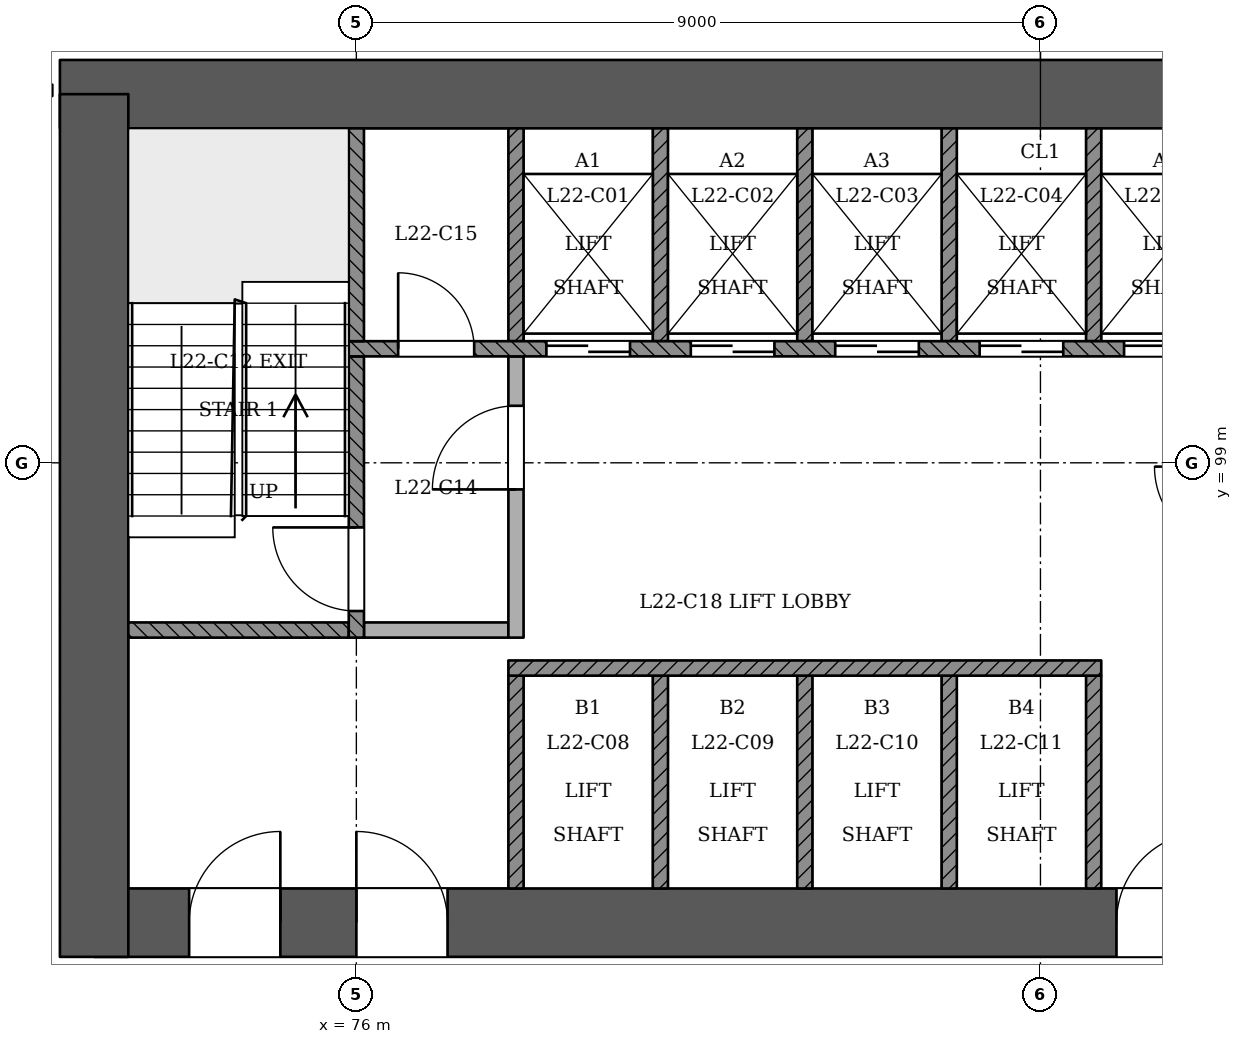
"""IFC4 building model, lengths in metres.
Left out: names, types, materials, properties, quantities, classifications, styles, units other than length and angle.
Written with IfcOpenShell. Run it as: python <this file> out.ifc"""

import sys

from ifc_helpers import new_model, si_unit, direction, frame, frame_2d, origin, place, context, subcontext, project, spatial, rectangle, extrude, element, fill, save


model = new_model("IFC4")
c1 = context("Model", 3, precision=1e-05, world=origin(), true_north=direction((0.0, 1.0)))
c2 = subcontext(c1, "Body", "Model", "MODEL_VIEW")
j1 = project(units=[si_unit("LENGTHUNIT", "METRE"), si_unit("PLANEANGLEUNIT", "RADIAN")], contexts=[c1])
p1 = place(None, origin())
s1 = spatial("IfcSite", under=j1, at=p1, CompositionType="ELEMENT")
p2 = place(p1, origin())
s2 = spatial("IfcBuilding", under=s1, at=p2, CompositionType="ELEMENT")
p3 = place(p2, frame((0.0, 0.0, 88.2)))
s3 = spatial("IfcBuildingStorey", under=s2, at=p3, CompositionType="ELEMENT", Elevation=88.2)
p4 = place(p3, frame((72.55, 92.95, 0.0), z_axis=(0.0, 0.0, 1.0), x_axis=(1.0, 0.0, 0.0)))
e1 = element("IfcWall", 1, at=p4, inside=s3, PredefinedType="SHEAR", context=c2, shape_type="SweptSolid", body=[
    extrude(rectangle(XDim=25.35, YDim=0.9, at=frame_2d((12.675, 0.0))), origin(), (0.0, 0.0, 1.0), 3.6),
])
p5 = place(p4, frame((1.25, 0.0, 0.0)))
e2 = element("IfcOpeningElement", 2, at=p5, cuts=e1, PredefinedType="OPENING", context=c2, shape_type="SweptSolid", body=[
    extrude(rectangle(XDim=1.2, YDim=2.1, at=frame_2d((0.6, 1.05))), frame((0.0, 0.46, 0.0), z_axis=(0.0, -1.0, 0.0), x_axis=(1.0, 0.0, 0.0)), (0.0, 0.0, 1.0), 0.921),
])
p6 = place(p4, frame((3.45, 0.0, 0.0)))
e3 = element("IfcOpeningElement", 3, at=p6, cuts=e1, PredefinedType="OPENING", context=c2, shape_type="SweptSolid", body=[
    extrude(rectangle(XDim=1.2, YDim=2.1, at=frame_2d((0.6, 1.05))), frame((0.0, 0.46, 0.0), z_axis=(0.0, -1.0, 0.0), x_axis=(1.0, 0.0, 0.0)), (0.0, 0.0, 1.0), 0.921),
])
p7 = place(p4, frame((13.45, 0.0, 0.0)))
e4 = element("IfcOpeningElement", 4, at=p7, cuts=e1, PredefinedType="OPENING", context=c2, shape_type="SweptSolid", body=[
    extrude(rectangle(XDim=1.2, YDim=2.1, at=frame_2d((0.6, 1.05))), frame((0.0, 0.46, 0.0), z_axis=(0.0, -1.0, 0.0), x_axis=(1.0, 0.0, 0.0)), (0.0, 0.0, 1.0), 0.921),
])
p8 = place(p4, frame((15.712, 0.0, 0.0)))
e5 = element("IfcOpeningElement", 5, at=p8, cuts=e1, PredefinedType="OPENING", context=c2, shape_type="SweptSolid", body=[
    extrude(rectangle(XDim=1.0, YDim=2.1, at=frame_2d((0.5, 1.05))), frame((0.0, 0.46, 0.0), z_axis=(0.0, -1.0, 0.0), x_axis=(1.0, 0.0, 0.0)), (0.0, 0.0, 1.0), 0.921),
])
p9 = place(p4, frame((18.35, 0.0, 0.0)))
e6 = element("IfcOpeningElement", 6, at=p9, cuts=e1, PredefinedType="OPENING", context=c2, shape_type="SweptSolid", body=[
    extrude(rectangle(XDim=1.0, YDim=2.1, at=frame_2d((0.5, 1.05))), frame((0.0, 0.46, 0.0), z_axis=(0.0, -1.0, 0.0), x_axis=(1.0, 0.0, 0.0)), (0.0, 0.0, 1.0), 0.921),
])
p10 = place(p4, frame((21.938, 0.0, 0.0)))
e7 = element("IfcOpeningElement", 7, at=p10, cuts=e1, PredefinedType="OPENING", context=c2, shape_type="SweptSolid", body=[
    extrude(rectangle(XDim=1.0, YDim=2.1, at=frame_2d((0.5, 1.05))), frame((0.0, 0.46, 0.0), z_axis=(0.0, -1.0, 0.0), x_axis=(1.0, 0.0, 0.0)), (0.0, 0.0, 1.0), 0.921),
])
p11 = place(p3, frame((97.45, 103.85, 0.0), z_axis=(0.0, 0.0, 1.0), x_axis=(-1.0, 0.0, 0.0)))
e8 = element("IfcWall", 8, at=p11, inside=s3, PredefinedType="SHEAR", context=c2, shape_type="SweptSolid", body=[
    extrude(rectangle(XDim=25.35, YDim=0.9, at=frame_2d((12.675, 0.0))), origin(), (0.0, 0.0, 1.0), 3.6),
])
p12 = place(p3, frame((72.55, 103.85, 0.0), z_axis=(0.0, 0.0, 1.0), x_axis=(0.0, -1.0, 0.0)))
e9 = element("IfcWall", 9, at=p12, inside=s3, PredefinedType="SHEAR", context=c2, shape_type="SweptSolid", body=[
    extrude(rectangle(XDim=11.35, YDim=0.9, at=frame_2d((5.675, 0.0))), origin(), (0.0, 0.0, 1.0), 3.6),
])
p13 = place(p3, frame((63.198, 97.473, 0.0), z_axis=(0.0, 0.0, 1.0), x_axis=(0.499996804348, -0.866027248787, 0.0)))
e10 = element("IfcWall", 10, at=p13, inside=s3, PredefinedType="PARTITIONING", context=c2, shape_type="SweptSolid", body=[
    extrude(rectangle(XDim=42.418, YDim=0.15, at=frame_2d((21.209, 0.0))), origin(), (0.0, 0.0, 1.0), 2.7),
])
p14 = place(p13, frame((3.123, 0.0, 0.0)))
e11 = element("IfcOpeningElement", 11, at=p14, cuts=e10, PredefinedType="OPENING", context=c2, shape_type="SweptSolid", body=[
    extrude(rectangle(XDim=1.2, YDim=2.1, at=frame_2d((0.6, 1.05))), frame((0.0, 0.085, 0.0), z_axis=(0.0, -1.0, 0.0), x_axis=(1.0, 0.0, 0.0)), (0.0, 0.0, 1.0), 0.171),
])
p15 = place(p13, frame((10.538, 0.0, 0.0)))
e12 = element("IfcOpeningElement", 12, at=p15, cuts=e10, PredefinedType="OPENING", context=c2, shape_type="SweptSolid", body=[
    extrude(rectangle(XDim=1.1, YDim=2.1, at=frame_2d((0.55, 1.05))), frame((0.0, 0.085, 0.0), z_axis=(0.0, -1.0, 0.0), x_axis=(1.0, 0.0, 0.0)), (0.0, 0.0, 1.0), 0.171),
])
p16 = place(p13, frame((12.814, 0.0, 0.0)))
e13 = element("IfcOpeningElement", 13, at=p16, cuts=e10, PredefinedType="OPENING", context=c2, shape_type="SweptSolid", body=[
    extrude(rectangle(XDim=1.0, YDim=2.1, at=frame_2d((0.5, 1.05))), frame((0.0, 0.085, 0.0), z_axis=(0.0, -1.0, 0.0), x_axis=(1.0, 0.0, 0.0)), (0.0, 0.0, 1.0), 0.171),
])
p17 = place(p13, frame((20.609, 0.0, 0.0)))
e14 = element("IfcOpeningElement", 14, at=p17, cuts=e10, PredefinedType="OPENING", context=c2, shape_type="SweptSolid", body=[
    extrude(rectangle(XDim=1.2, YDim=2.1, at=frame_2d((0.6, 1.05))), frame((0.0, 0.085, 0.0), z_axis=(0.0, -1.0, 0.0), x_axis=(1.0, 0.0, 0.0)), (0.0, 0.0, 1.0), 0.171),
])
p18 = place(p13, frame((27.459, 0.0, 0.0)))
e15 = element("IfcOpeningElement", 15, at=p18, cuts=e10, PredefinedType="OPENING", context=c2, shape_type="SweptSolid", body=[
    extrude(rectangle(XDim=1.0, YDim=2.1, at=frame_2d((0.5, 1.05))), frame((0.0, 0.085, 0.0), z_axis=(0.0, -1.0, 0.0), x_axis=(1.0, 0.0, 0.0)), (0.0, 0.0, 1.0), 0.171),
])
p19 = place(p13, frame((31.959, 0.0, 0.0)))
e16 = element("IfcOpeningElement", 16, at=p19, cuts=e10, PredefinedType="OPENING", context=c2, shape_type="SweptSolid", body=[
    extrude(rectangle(XDim=1.0, YDim=2.1, at=frame_2d((0.5, 1.05))), frame((0.0, 0.085, 0.0), z_axis=(0.0, -1.0, 0.0), x_axis=(1.0, 0.0, 0.0)), (0.0, 0.0, 1.0), 0.171),
])
p20 = place(p13, frame((40.905, 0.0, 0.0)))
e17 = element("IfcOpeningElement", 17, at=p20, cuts=e10, PredefinedType="OPENING", context=c2, shape_type="SweptSolid", body=[
    extrude(rectangle(XDim=1.2, YDim=2.1, at=frame_2d((0.6, 1.05))), frame((0.0, 0.085, 0.0), z_axis=(0.0, -1.0, 0.0), x_axis=(1.0, 0.0, 0.0)), (0.0, 0.0, 1.0), 0.171),
])
for number, where, z_axis, x_axis in (
    (18, (78.1, 93.4, 0.0), (0.0, 0.0, 1.0), (0.0, 1.0, 0.0)),
    (19, (80.0, 93.4, 0.0), (0.0, 0.0, 1.0), (0.0, 1.0, 0.0)),
    (20, (81.9, 93.4, 0.0), (0.0, 0.0, 1.0), (0.0, 1.0, 0.0)),
    (21, (83.8, 93.4, 0.0), (0.0, 0.0, 1.0), (0.0, 1.0, 0.0)),
    (22, (85.7, 93.4, 0.0), (0.0, 0.0, 1.0), (0.0, 1.0, 0.0)),
):
    element("IfcWall", number, at=place(p3, frame(where, z_axis=z_axis, x_axis=x_axis)), inside=s3, PredefinedType="SOLIDWALL", context=c2, shape_type="SweptSolid", body=[
        extrude(rectangle(XDim=2.8, YDim=0.2, at=frame_2d((1.4, 0.0))), origin(), (0.0, 0.0, 1.0), 3.1),
    ])
p21 = place(p3, frame((78.0, 96.3, 0.0), z_axis=(0.0, 0.0, 1.0), x_axis=(1.0, 0.0, 0.0)))
e23 = element("IfcWall", 23, at=p21, inside=s3, PredefinedType="SOLIDWALL", context=c2, shape_type="SweptSolid", body=[
    extrude(rectangle(XDim=7.8, YDim=0.2, at=frame_2d((3.9, 0.0))), origin(), (0.0, 0.0, 1.0), 3.1),
])
p22 = place(p3, frame((73.0, 96.8, 0.0), z_axis=(0.0, 0.0, 1.0), x_axis=(1.0, 0.0, 0.0)))
e24 = element("IfcWall", 24, at=p22, inside=s3, PredefinedType="SOLIDWALL", context=c2, shape_type="SweptSolid", body=[
    extrude(rectangle(XDim=2.9, YDim=0.2, at=frame_2d((1.45, 0.0))), origin(), (0.0, 0.0, 1.0), 3.1),
])
p23 = place(p3, frame((76.0, 96.7, 0.0), z_axis=(0.0, 0.0, 1.0), x_axis=(0.0, 1.0, 0.0)))
e25 = element("IfcWall", 25, at=p23, inside=s3, PredefinedType="SOLIDWALL", context=c2, shape_type="SweptSolid", body=[
    extrude(rectangle(XDim=3.7, YDim=0.2, at=frame_2d((1.85, 0.0))), origin(), (0.0, 0.0, 1.0), 3.1),
])
p24 = place(p23, frame((0.35, 0.0, 0.0)))
e26 = element("IfcOpeningElement", 26, at=p24, cuts=e25, PredefinedType="OPENING", context=c2, shape_type="SweptSolid", body=[
    extrude(rectangle(XDim=1.1, YDim=2.1, at=frame_2d((0.55, 1.05))), frame((0.0, 0.11, 0.0), z_axis=(0.0, -1.0, 0.0), x_axis=(1.0, 0.0, 0.0)), (0.0, 0.0, 1.0), 0.221),
])
p25 = place(p3, frame((76.1, 96.8, 0.0), z_axis=(0.0, 0.0, 1.0), x_axis=(1.0, 0.0, 0.0)))
e27 = element("IfcWall", 27, at=p25, inside=s3, PredefinedType="PARTITIONING", context=c2, shape_type="SweptSolid", body=[
    extrude(rectangle(XDim=1.9, YDim=0.2, at=frame_2d((0.95, 0.0))), origin(), (0.0, 0.0, 1.0), 3.1),
])
p26 = place(p3, frame((78.1, 96.7, 0.0), z_axis=(0.0, 0.0, 1.0), x_axis=(0.0, 1.0, 0.0)))
e28 = element("IfcWall", 28, at=p26, inside=s3, PredefinedType="PARTITIONING", context=c2, shape_type="SweptSolid", body=[
    extrude(rectangle(XDim=3.7, YDim=0.2, at=frame_2d((1.85, 0.0))), origin(), (0.0, 0.0, 1.0), 3.1),
])
p27 = place(p26, frame((1.95, 0.0, 0.0)))
e29 = element("IfcOpeningElement", 29, at=p27, cuts=e28, PredefinedType="OPENING", context=c2, shape_type="SweptSolid", body=[
    extrude(rectangle(XDim=1.1, YDim=2.1, at=frame_2d((0.55, 1.05))), frame((0.0, 0.11, 0.0), z_axis=(0.0, -1.0, 0.0), x_axis=(1.0, 0.0, 0.0)), (0.0, 0.0, 1.0), 0.221),
])
p28 = place(p3, frame((75.9, 100.5, 0.0), z_axis=(0.0, 0.0, 1.0), x_axis=(1.0, 0.0, 0.0)))
e30 = element("IfcWall", 30, at=p28, inside=s3, PredefinedType="SOLIDWALL", context=c2, shape_type="SweptSolid", body=[
    extrude(rectangle(XDim=18.2, YDim=0.2, at=frame_2d((9.1, 0.0))), origin(), (0.0, 0.0, 1.0), 3.1),
])
p29 = place(p28, frame((2.6, 0.0, 0.0)))
e31 = element("IfcOpeningElement", 31, at=p29, cuts=e30, PredefinedType="OPENING", context=c2, shape_type="SweptSolid", body=[
    extrude(rectangle(XDim=1.1, YDim=2.1, at=frame_2d((0.55, 1.05))), frame((0.0, 0.11, 0.0), z_axis=(0.0, -1.0, 0.0), x_axis=(1.0, 0.0, 0.0)), (0.0, 0.0, 1.0), 0.221),
])
p30 = place(p28, frame((4.5, 0.0, 0.0)))
e32 = element("IfcOpeningElement", 32, at=p30, cuts=e30, PredefinedType="OPENING", context=c2, shape_type="SweptSolid", body=[
    extrude(rectangle(XDim=1.1, YDim=2.1, at=frame_2d((0.55, 1.05))), frame((0.0, 0.11, 0.0), z_axis=(0.0, -1.0, 0.0), x_axis=(1.0, 0.0, 0.0)), (0.0, 0.0, 1.0), 0.221),
])
p31 = place(p28, frame((6.4, 0.0, 0.0)))
e33 = element("IfcOpeningElement", 33, at=p31, cuts=e30, PredefinedType="OPENING", context=c2, shape_type="SweptSolid", body=[
    extrude(rectangle(XDim=1.1, YDim=2.1, at=frame_2d((0.55, 1.05))), frame((0.0, 0.11, 0.0), z_axis=(0.0, -1.0, 0.0), x_axis=(1.0, 0.0, 0.0)), (0.0, 0.0, 1.0), 0.221),
])
p32 = place(p28, frame((8.3, 0.0, 0.0)))
e34 = element("IfcOpeningElement", 34, at=p32, cuts=e30, PredefinedType="OPENING", context=c2, shape_type="SweptSolid", body=[
    extrude(rectangle(XDim=1.1, YDim=2.1, at=frame_2d((0.55, 1.05))), frame((0.0, 0.11, 0.0), z_axis=(0.0, -1.0, 0.0), x_axis=(1.0, 0.0, 0.0)), (0.0, 0.0, 1.0), 0.221),
])
p33 = place(p28, frame((10.2, 0.0, 0.0)))
e35 = element("IfcOpeningElement", 35, at=p33, cuts=e30, PredefinedType="OPENING", context=c2, shape_type="SweptSolid", body=[
    extrude(rectangle(XDim=1.1, YDim=2.1, at=frame_2d((0.55, 1.05))), frame((0.0, 0.11, 0.0), z_axis=(0.0, -1.0, 0.0), x_axis=(1.0, 0.0, 0.0)), (0.0, 0.0, 1.0), 0.221),
])
p34 = place(p28, frame((12.1, 0.0, 0.0)))
e36 = element("IfcOpeningElement", 36, at=p34, cuts=e30, PredefinedType="OPENING", context=c2, shape_type="SweptSolid", body=[
    extrude(rectangle(XDim=1.1, YDim=2.1, at=frame_2d((0.55, 1.05))), frame((0.0, 0.11, 0.0), z_axis=(0.0, -1.0, 0.0), x_axis=(1.0, 0.0, 0.0)), (0.0, 0.0, 1.0), 0.221),
])
p35 = place(p28, frame((14.0, 0.0, 0.0)))
e37 = element("IfcOpeningElement", 37, at=p35, cuts=e30, PredefinedType="OPENING", context=c2, shape_type="SweptSolid", body=[
    extrude(rectangle(XDim=1.1, YDim=2.1, at=frame_2d((0.55, 1.05))), frame((0.0, 0.11, 0.0), z_axis=(0.0, -1.0, 0.0), x_axis=(1.0, 0.0, 0.0)), (0.0, 0.0, 1.0), 0.221),
])
p36 = place(p28, frame((0.65, 0.0, 0.0)))
e38 = element("IfcOpeningElement", 38, at=p36, cuts=e30, PredefinedType="OPENING", context=c2, shape_type="SweptSolid", body=[
    extrude(rectangle(XDim=1.0, YDim=2.1, at=frame_2d((0.5, 1.05))), frame((0.0, 0.11, 0.0), z_axis=(0.0, -1.0, 0.0), x_axis=(1.0, 0.0, 0.0)), (0.0, 0.0, 1.0), 0.221),
])
p37 = place(p28, frame((16.3, 0.0, 0.0)))
e39 = element("IfcOpeningElement", 39, at=p37, cuts=e30, PredefinedType="OPENING", context=c2, shape_type="SweptSolid", body=[
    extrude(rectangle(XDim=1.0, YDim=2.1, at=frame_2d((0.5, 1.05))), frame((0.0, 0.11, 0.0), z_axis=(0.0, -1.0, 0.0), x_axis=(1.0, 0.0, 0.0)), (0.0, 0.0, 1.0), 0.221),
])
for number, where, z_axis, x_axis in (
    (40, (76.0, 100.6, 0.0), (0.0, 0.0, 1.0), (0.0, 1.0, 0.0)),
    (41, (78.1, 100.6, 0.0), (0.0, 0.0, 1.0), (0.0, 1.0, 0.0)),
    (42, (80.0, 100.6, 0.0), (0.0, 0.0, 1.0), (0.0, 1.0, 0.0)),
    (43, (81.9, 100.6, 0.0), (0.0, 0.0, 1.0), (0.0, 1.0, 0.0)),
    (44, (83.8, 100.6, 0.0), (0.0, 0.0, 1.0), (0.0, 1.0, 0.0)),
    (45, (85.7, 100.6, 0.0), (0.0, 0.0, 1.0), (0.0, 1.0, 0.0)),
):
    element("IfcWall", number, at=place(p3, frame(where, z_axis=z_axis, x_axis=x_axis)), inside=s3, PredefinedType="SOLIDWALL", context=c2, shape_type="SweptSolid", body=[
        extrude(rectangle(XDim=2.8, YDim=0.2, at=frame_2d((1.4, 0.0))), origin(), (0.0, 0.0, 1.0), 3.1),
    ])
p38 = place(p29, origin())
e46 = element("IfcDoor", 46, at=p38, inside=s3, OperationType="SLIDING_TO_RIGHT", PredefinedType="NOTDEFINED", context=c2, shape_type="SweptSolid", body=[
    extrude(rectangle(XDim=1.1, YDim=2.1, at=frame_2d((0.55, 1.05))), frame((0.0, 0.025, 0.0), z_axis=(0.0, -1.0, 0.0), x_axis=(1.0, 0.0, 0.0)), (0.0, 0.0, 1.0), 0.05),
])
fill(e31, e46)
p39 = place(p30, origin())
e47 = element("IfcDoor", 47, at=p39, inside=s3, OperationType="SLIDING_TO_LEFT", PredefinedType="NOTDEFINED", context=c2, shape_type="SweptSolid", body=[
    extrude(rectangle(XDim=1.1, YDim=2.1, at=frame_2d((0.55, 1.05))), frame((0.0, 0.025, 0.0), z_axis=(0.0, -1.0, 0.0), x_axis=(1.0, 0.0, 0.0)), (0.0, 0.0, 1.0), 0.05),
])
fill(e32, e47)
p40 = place(p31, origin())
e48 = element("IfcDoor", 48, at=p40, inside=s3, OperationType="SLIDING_TO_RIGHT", PredefinedType="NOTDEFINED", context=c2, shape_type="SweptSolid", body=[
    extrude(rectangle(XDim=1.1, YDim=2.1, at=frame_2d((0.55, 1.05))), frame((0.0, 0.025, 0.0), z_axis=(0.0, -1.0, 0.0), x_axis=(1.0, 0.0, 0.0)), (0.0, 0.0, 1.0), 0.05),
])
fill(e33, e48)
p41 = place(p32, origin())
e49 = element("IfcDoor", 49, at=p41, inside=s3, OperationType="SLIDING_TO_LEFT", PredefinedType="NOTDEFINED", context=c2, shape_type="SweptSolid", body=[
    extrude(rectangle(XDim=1.1, YDim=2.1, at=frame_2d((0.55, 1.05))), frame((0.0, 0.025, 0.0), z_axis=(0.0, -1.0, 0.0), x_axis=(1.0, 0.0, 0.0)), (0.0, 0.0, 1.0), 0.05),
])
fill(e34, e49)
p42 = place(p33, origin())
e50 = element("IfcDoor", 50, at=p42, inside=s3, OperationType="SLIDING_TO_RIGHT", PredefinedType="NOTDEFINED", context=c2, shape_type="SweptSolid", body=[
    extrude(rectangle(XDim=1.1, YDim=2.1, at=frame_2d((0.55, 1.05))), frame((0.0, 0.025, 0.0), z_axis=(0.0, -1.0, 0.0), x_axis=(1.0, 0.0, 0.0)), (0.0, 0.0, 1.0), 0.05),
])
fill(e35, e50)
p43 = place(p24, origin())
e51 = element("IfcDoor", 51, at=p43, inside=s3, OperationType="SINGLE_SWING_RIGHT", PredefinedType="NOTDEFINED", context=c2, shape_type="SweptSolid", body=[
    extrude(rectangle(XDim=1.1, YDim=2.1, at=frame_2d((0.55, 1.05))), frame((0.0, 0.025, 0.0), z_axis=(0.0, -1.0, 0.0), x_axis=(1.0, 0.0, 0.0)), (0.0, 0.0, 1.0), 0.05),
])
fill(e26, e51)
p44 = place(p27, origin())
e52 = element("IfcDoor", 52, at=p44, inside=s3, OperationType="SINGLE_SWING_LEFT", PredefinedType="NOTDEFINED", context=c2, shape_type="SweptSolid", body=[
    extrude(rectangle(XDim=1.1, YDim=2.1, at=frame_2d((0.55, 1.05))), frame((0.0, 0.025, 0.0), z_axis=(0.0, -1.0, 0.0), x_axis=(1.0, 0.0, 0.0)), (0.0, 0.0, 1.0), 0.05),
])
fill(e29, e52)
p45 = place(p5, origin())
e53 = element("IfcDoor", 53, at=p45, inside=s3, OperationType="SINGLE_SWING_RIGHT", PredefinedType="NOTDEFINED", context=c2, shape_type="SweptSolid", body=[
    extrude(rectangle(XDim=1.2, YDim=2.1, at=frame_2d((0.6, 1.05))), frame((0.0, 0.025, 0.0), z_axis=(0.0, -1.0, 0.0), x_axis=(1.0, 0.0, 0.0)), (0.0, 0.0, 1.0), 0.05),
])
fill(e2, e53)
p46 = place(p6, origin())
e54 = element("IfcDoor", 54, at=p46, inside=s3, OperationType="SINGLE_SWING_LEFT", PredefinedType="NOTDEFINED", context=c2, shape_type="SweptSolid", body=[
    extrude(rectangle(XDim=1.2, YDim=2.1, at=frame_2d((0.6, 1.05))), frame((0.0, 0.025, 0.0), z_axis=(0.0, -1.0, 0.0), x_axis=(1.0, 0.0, 0.0)), (0.0, 0.0, 1.0), 0.05),
])
fill(e3, e54)
p47 = place(p7, origin())
e55 = element("IfcDoor", 55, at=p47, inside=s3, OperationType="SINGLE_SWING_RIGHT", PredefinedType="NOTDEFINED", context=c2, shape_type="SweptSolid", body=[
    extrude(rectangle(XDim=1.2, YDim=2.1, at=frame_2d((0.6, 1.05))), frame((0.0, 0.025, 0.0), z_axis=(0.0, -1.0, 0.0), x_axis=(1.0, 0.0, 0.0)), (0.0, 0.0, 1.0), 0.05),
])
fill(e4, e55)
p48 = place(p36, origin())
e56 = element("IfcDoor", 56, at=p48, inside=s3, OperationType="SINGLE_SWING_LEFT", PredefinedType="NOTDEFINED", context=c2, shape_type="SweptSolid", body=[
    extrude(rectangle(XDim=1.0, YDim=2.1, at=frame_2d((0.5, 1.05))), frame((0.0, 0.025, 0.0), z_axis=(0.0, -1.0, 0.0), x_axis=(1.0, 0.0, 0.0)), (0.0, 0.0, 1.0), 0.05),
])
fill(e38, e56)
save(model, sys.argv[1])
